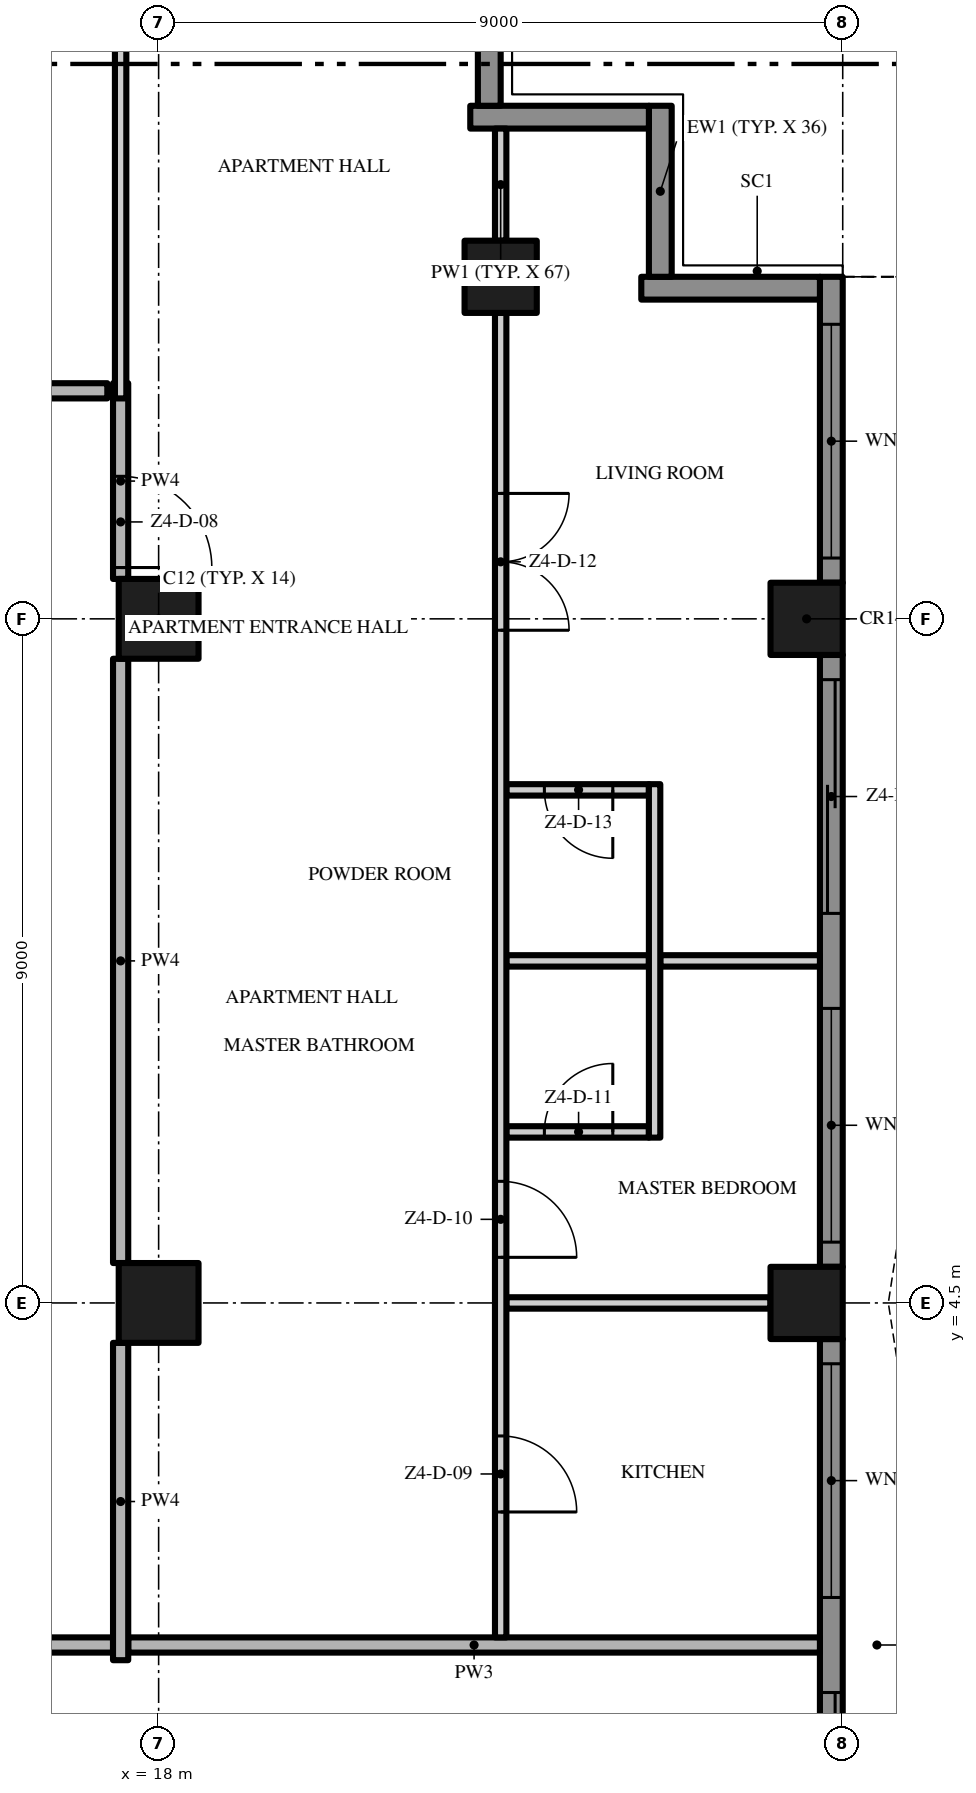
"""IFC4 building model, lengths in metres.
Left out: names, types, materials, properties, quantities, classifications, styles, units other than length and angle.
Written with IfcOpenShell. Run it as: python <this file> out.ifc"""

import sys

from ifc_helpers import new_model, si_unit, direction, frame, frame_2d, origin, origin_2d, place, context, subcontext, project, spatial, polyline, rectangle, outline, extrude, element, fill, save


model = new_model("IFC4")
c1 = context("Model", 3, precision=1e-05, world=origin(), true_north=direction((0.0, 1.0)))
c2 = subcontext(c1, "Body", "Model", "MODEL_VIEW")
j1 = project(units=[si_unit("LENGTHUNIT", "METRE"), si_unit("PLANEANGLEUNIT", "RADIAN")], contexts=[c1])
p1 = place(None, origin())
s1 = spatial("IfcSite", under=j1, at=p1, CompositionType="ELEMENT")
p2 = place(p1, origin())
s2 = spatial("IfcBuilding", under=s1, at=p2, CompositionType="ELEMENT")
p3 = place(p2, frame((0.0, 0.0, 218.6)))
s3 = spatial("IfcBuildingStorey", under=s2, at=p3, CompositionType="ELEMENT", Elevation=218.6)
for number, where, z_axis, x_axis in (
    (1, (18.0, 13.5, 0.0), (0.0, 0.0, 1.0), (1.0, 0.0, 0.0)),
    (2, (18.0, 4.5, 0.0), (0.0, 0.0, 1.0), (1.0, 0.0, 0.0)),
):
    element("IfcColumn", number, at=place(p3, frame(where, z_axis=z_axis, x_axis=x_axis)), inside=s3, PredefinedType="COLUMN", context=c2, shape_type="SweptSolid", body=[
        extrude(rectangle(XDim=1.05, YDim=1.05, at=origin_2d()), origin(), (0.0, 0.0, 1.0), 3.5),
    ])
for number, where, z_axis, x_axis in (
    (3, (26.525, 13.5, 0.0), (0.0, 0.0, 1.0), (1.0, 0.0, 0.0)),
    (4, (22.5, 18.0, 0.0), (0.0, 0.0, 1.0), (1.0, 0.0, 0.0)),
    (5, (26.525, 4.5, 0.0), (0.0, 0.0, 1.0), (1.0, 0.0, 0.0)),
):
    element("IfcColumn", number, at=place(p3, frame(where, z_axis=z_axis, x_axis=x_axis)), inside=s3, PredefinedType="COLUMN", context=c2, shape_type="SweptSolid", body=[
        extrude(rectangle(XDim=0.95, YDim=0.95, at=origin_2d()), origin(), (0.0, 0.0, 1.0), 3.5),
    ])
p4 = place(p3, frame((26.85, 4.025, 0.0), z_axis=(0.0, 0.0, 1.0), x_axis=(0.0, -1.0, 0.0)))
e6 = element("IfcWall", 6, at=p4, inside=s3, PredefinedType="SOLIDWALL", context=c2, shape_type="SweptSolid", body=[
    extrude(rectangle(XDim=8.05, YDim=0.3, at=frame_2d((4.025, 0.0))), origin(), (0.0, 0.0, 1.0), 3.5),
])
p5 = place(p4, frame((4.65, 0.0, 0.0)))
e7 = element("IfcOpeningElement", 7, at=p5, cuts=e6, PredefinedType="OPENING", context=c2, shape_type="SweptSolid", body=[
    extrude(rectangle(XDim=3.075, YDim=2.4, at=frame_2d((1.538, 1.2))), frame((0.0, 0.16, 0.0), z_axis=(0.0, -1.0, 0.0), x_axis=(1.0, 0.0, 0.0)), (0.0, 0.0, 1.0), 0.32),
])
p6 = place(p4, frame((0.325, 0.0, 0.45)))
e8 = element("IfcOpeningElement", 8, at=p6, cuts=e6, PredefinedType="OPENING", context=c2, shape_type="SweptSolid", body=[
    extrude(rectangle(XDim=3.075, YDim=2.65, at=frame_2d((1.538, 1.325))), frame((0.0, 0.16, 0.0), z_axis=(0.0, -1.0, 0.0), x_axis=(1.0, 0.0, 0.0)), (0.0, 0.0, 1.0), 0.32),
])
p7 = place(p3, frame((26.85, 13.025, 0.0), z_axis=(0.0, 0.0, 1.0), x_axis=(0.0, -1.0, 0.0)))
e9 = element("IfcWall", 9, at=p7, inside=s3, PredefinedType="SOLIDWALL", context=c2, shape_type="SweptSolid", body=[
    extrude(rectangle(XDim=8.05, YDim=0.3, at=frame_2d((4.025, 0.0))), origin(), (0.0, 0.0, 1.0), 3.5),
])
p8 = place(p7, frame((4.65, 0.0, 0.45)))
e10 = element("IfcOpeningElement", 10, at=p8, cuts=e9, PredefinedType="OPENING", context=c2, shape_type="SweptSolid", body=[
    extrude(rectangle(XDim=3.075, YDim=2.65, at=frame_2d((1.538, 1.325))), frame((0.0, 0.16, 0.0), z_axis=(0.0, -1.0, 0.0), x_axis=(1.0, 0.0, 0.0)), (0.0, 0.0, 1.0), 0.32),
])
p9 = place(p7, frame((0.325, 0.0, 0.0)))
e11 = element("IfcOpeningElement", 11, at=p9, cuts=e9, PredefinedType="OPENING", context=c2, shape_type="SweptSolid", body=[
    extrude(rectangle(XDim=3.075, YDim=2.4, at=frame_2d((1.538, 1.2))), frame((0.0, 0.16, 0.0), z_axis=(0.0, -1.0, 0.0), x_axis=(1.0, 0.0, 0.0)), (0.0, 0.0, 1.0), 0.32),
])
p10 = place(p3, frame((26.85, 18.0, 0.0), z_axis=(0.0, 0.0, 1.0), x_axis=(0.0, -1.0, 0.0)))
e12 = element("IfcWall", 12, at=p10, inside=s3, PredefinedType="SOLIDWALL", context=c2, shape_type="SweptSolid", body=[
    extrude(rectangle(XDim=4.025, YDim=0.3, at=frame_2d((2.013, 0.0))), origin(), (0.0, 0.0, 1.0), 3.5),
])
p11 = place(p10, frame((0.625, 0.0, 0.45)))
e13 = element("IfcOpeningElement", 13, at=p11, cuts=e12, PredefinedType="OPENING", context=c2, shape_type="SweptSolid", body=[
    extrude(rectangle(XDim=3.075, YDim=2.65, at=frame_2d((1.538, 1.325))), frame((0.0, 0.16, 0.0), z_axis=(0.0, -1.0, 0.0), x_axis=(1.0, 0.0, 0.0)), (0.0, 0.0, 1.0), 0.32),
])
p12 = place(p3, frame((24.35, 17.85, 0.0), z_axis=(0.0, 0.0, 1.0), x_axis=(1.0, 0.0, 0.0)))
e14 = element("IfcWall", 14, at=p12, inside=s3, PredefinedType="SOLIDWALL", context=c2, shape_type="SweptSolid", body=[
    extrude(rectangle(XDim=2.35, YDim=0.3, at=frame_2d((1.175, 0.0))), origin(), (0.0, 0.0, 1.0), 3.5),
])
p13 = place(p3, frame((24.6, 20.25, 0.0), z_axis=(0.0, 0.0, 1.0), x_axis=(0.0, -1.0, 0.0)))
e15 = element("IfcWall", 15, at=p13, inside=s3, PredefinedType="SOLIDWALL", context=c2, shape_type="SweptSolid", body=[
    extrude(rectangle(XDim=2.25, YDim=0.3, at=frame_2d((1.125, 0.0))), origin(), (0.0, 0.0, 1.0), 3.5),
])
p14 = place(p3, frame((22.1, 20.1, 0.0), z_axis=(0.0, 0.0, 1.0), x_axis=(1.0, 0.0, 0.0)))
e16 = element("IfcWall", 16, at=p14, inside=s3, PredefinedType="SOLIDWALL", context=c2, shape_type="SweptSolid", body=[
    extrude(rectangle(XDim=2.35, YDim=0.3, at=frame_2d((1.175, 0.0))), origin(), (0.0, 0.0, 1.0), 3.5),
])
p15 = place(p3, frame((22.35, 22.5, 0.0), z_axis=(0.0, 0.0, 1.0), x_axis=(0.0, -1.0, 0.0)))
e17 = element("IfcWall", 17, at=p15, inside=s3, PredefinedType="SOLIDWALL", context=c2, shape_type="SweptSolid", body=[
    extrude(rectangle(XDim=2.25, YDim=0.3, at=frame_2d((1.125, 0.0))), origin(), (0.0, 0.0, 1.0), 3.5),
])
p16 = place(p3, origin())
e18 = element("IfcWall", 18, at=p16, inside=s3, PredefinedType="USERDEFINED", context=c2, shape_type="SweptSolid", body=[
    extrude(outline(polyline([(30.0, -18.0), (29.771, -16.5), (29.171, -15.0), (28.429, -13.5), (27.829, -12.0), (27.6, -10.5), (27.829, -9.0), (28.429, -7.5), (29.171, -6.0), (29.771, -4.5), (30.0, -3.0), (29.771, -1.5), (29.171, 0.0), (28.429, 1.5), (27.829, 3.0), (27.6, 4.5), (27.829, 6.0), (28.429, 7.5), (29.171, 9.0), (29.771, 10.5), (30.0, 12.0), (29.771, 13.5), (29.171, 15.0), (28.429, 16.5), (27.829, 18.0), (27.597, 17.907), (28.201, 16.398), (28.942, 14.898), (29.528, 13.434), (29.747, 12.0), (29.528, 10.566), (28.942, 9.102), (28.201, 7.602), (27.586, 6.066), (27.347, 4.5), (27.586, 2.934), (28.201, 1.398), (28.942, -0.102), (29.528, -1.566), (29.747, -3.0), (29.528, -4.434), (28.942, -5.898), (28.201, -7.398), (27.586, -8.934), (27.347, -10.5), (27.586, -12.066), (28.201, -13.602), (28.942, -15.102), (29.528, -16.566), (29.753, -18.038), (30.0, -18.0)])), origin(), (0.0, 0.0, 1.0), 0.9),
])
p17 = place(p3, frame((17.4, 0.0, 0.0), z_axis=(0.0, 0.0, 1.0), x_axis=(-1.0, 0.0, 0.0)))
e19 = element("IfcWall", 19, at=p17, inside=s3, PredefinedType="PARTITIONING", context=c2, shape_type="SweptSolid", body=[
    extrude(rectangle(XDim=17.3, YDim=0.2, at=frame_2d((8.65, 0.0))), origin(), (0.0, 0.0, 1.0), 3.5),
])
p18 = place(p17, frame((7.65, 0.0, 0.0)))
e20 = element("IfcOpeningElement", 20, at=p18, cuts=e19, PredefinedType="OPENING", context=c2, shape_type="SweptSolid", body=[
    extrude(rectangle(XDim=1.5, YDim=2.4, at=frame_2d((0.75, 1.2))), frame((0.0, 0.11, 0.0), z_axis=(0.0, -1.0, 0.0), x_axis=(1.0, 0.0, 0.0)), (0.0, 0.0, 1.0), 0.22),
])
p19 = place(p3, frame((17.6, 0.0, 0.0), z_axis=(0.0, 0.0, 1.0), x_axis=(1.0, 0.0, 0.0)))
e21 = element("IfcWall", 21, at=p19, inside=s3, PredefinedType="PARTITIONING", context=c2, shape_type="SweptSolid", body=[
    extrude(rectangle(XDim=9.1, YDim=0.2, at=frame_2d((4.55, 0.0))), origin(), (0.0, 0.0, 1.0), 3.5),
])
p20 = place(p3, frame((22.575, 4.5, 0.0), z_axis=(0.0, 0.0, 1.0), x_axis=(1.0, 0.0, 0.0)))
e22 = element("IfcWall", 22, at=p20, inside=s3, PredefinedType="PARTITIONING", context=c2, shape_type="SweptSolid", body=[
    extrude(rectangle(XDim=3.475, YDim=0.15, at=frame_2d((1.738, 0.0))), origin(), (0.0, 0.0, 1.0), 3.5),
])
p21 = place(p3, frame((22.575, 6.75, 0.0), z_axis=(0.0, 0.0, 1.0), x_axis=(1.0, 0.0, 0.0)))
e23 = element("IfcWall", 23, at=p21, inside=s3, PredefinedType="PARTITIONING", context=c2, shape_type="SweptSolid", body=[
    extrude(rectangle(XDim=1.875, YDim=0.15, at=frame_2d((0.938, 0.0))), origin(), (0.0, 0.0, 1.0), 3.5),
])
p22 = place(p21, frame((0.5, 0.0, 0.0)))
e24 = element("IfcOpeningElement", 24, at=p22, cuts=e23, PredefinedType="OPENING", context=c2, shape_type="SweptSolid", body=[
    extrude(rectangle(XDim=0.9, YDim=2.1, at=frame_2d((0.45, 1.05))), frame((0.0, 0.085, 0.0), z_axis=(0.0, -1.0, 0.0), x_axis=(1.0, 0.0, 0.0)), (0.0, 0.0, 1.0), 0.17),
])
p23 = place(p3, frame((22.575, 9.0, 0.0), z_axis=(0.0, 0.0, 1.0), x_axis=(1.0, 0.0, 0.0)))
e25 = element("IfcWall", 25, at=p23, inside=s3, PredefinedType="PARTITIONING", context=c2, shape_type="SweptSolid", body=[
    extrude(rectangle(XDim=1.875, YDim=0.15, at=frame_2d((0.938, 0.0))), origin(), (0.0, 0.0, 1.0), 3.5),
])
p24 = place(p3, frame((24.6, 9.0, 0.0), z_axis=(0.0, 0.0, 1.0), x_axis=(1.0, 0.0, 0.0)))
e26 = element("IfcWall", 26, at=p24, inside=s3, PredefinedType="PARTITIONING", context=c2, shape_type="SweptSolid", body=[
    extrude(rectangle(XDim=2.1, YDim=0.15, at=frame_2d((1.05, 0.0))), origin(), (0.0, 0.0, 1.0), 3.5),
])
p25 = place(p3, frame((24.45, 11.25, 0.0), z_axis=(0.0, 0.0, 1.0), x_axis=(-1.0, 0.0, 0.0)))
e27 = element("IfcWall", 27, at=p25, inside=s3, PredefinedType="PARTITIONING", context=c2, shape_type="SweptSolid", body=[
    extrude(rectangle(XDim=1.875, YDim=0.15, at=frame_2d((0.938, 0.0))), origin(), (0.0, 0.0, 1.0), 3.5),
])
p26 = place(p25, frame((0.475, 0.0, 0.0)))
e28 = element("IfcOpeningElement", 28, at=p26, cuts=e27, PredefinedType="OPENING", context=c2, shape_type="SweptSolid", body=[
    extrude(rectangle(XDim=0.9, YDim=2.1, at=frame_2d((0.45, 1.05))), frame((0.0, 0.085, 0.0), z_axis=(0.0, -1.0, 0.0), x_axis=(1.0, 0.0, 0.0)), (0.0, 0.0, 1.0), 0.17),
])
p27 = place(p3, frame((13.5, 16.5, 0.0), z_axis=(0.0, 0.0, 1.0), x_axis=(1.0, 0.0, 0.0)))
e29 = element("IfcWall", 29, at=p27, inside=s3, PredefinedType="PARTITIONING", context=c2, shape_type="SweptSolid", body=[
    extrude(rectangle(XDim=3.825, YDim=0.2, at=frame_2d((1.913, 0.0))), origin(), (0.0, 0.0, 1.0), 3.5),
])
p28 = place(p27, frame((1.55, 0.0, 0.0)))
e30 = element("IfcOpeningElement", 30, at=p28, cuts=e29, PredefinedType="OPENING", context=c2, shape_type="SweptSolid", body=[
    extrude(rectangle(XDim=0.9, YDim=2.1, at=frame_2d((0.45, 1.05))), frame((0.0, 0.11, 0.0), z_axis=(0.0, -1.0, 0.0), x_axis=(1.0, 0.0, 0.0)), (0.0, 0.0, 1.0), 0.22),
])
p29 = place(p3, frame((17.5, -0.2, 0.0), z_axis=(0.0, 0.0, 1.0), x_axis=(0.0, 1.0, 0.0)))
e31 = element("IfcWall", 31, at=p29, inside=s3, PredefinedType="PARTITIONING", context=c2, shape_type="SweptSolid", body=[
    extrude(rectangle(XDim=4.175, YDim=0.2, at=frame_2d((2.087, 0.0))), origin(), (0.0, 0.0, 1.0), 3.5),
])
p30 = place(p3, frame((17.5, 5.025, 0.0), z_axis=(0.0, 0.0, 1.0), x_axis=(0.0, 1.0, 0.0)))
e32 = element("IfcWall", 32, at=p30, inside=s3, PredefinedType="PARTITIONING", context=c2, shape_type="SweptSolid", body=[
    extrude(rectangle(XDim=7.95, YDim=0.2, at=frame_2d((3.975, 0.0))), origin(), (0.0, 0.0, 1.0), 3.5),
])
p31 = place(p3, frame((17.5, 16.6, 0.0), z_axis=(0.0, 0.0, 1.0), x_axis=(0.0, -1.0, 0.0)))
e33 = element("IfcWall", 33, at=p31, inside=s3, PredefinedType="PARTITIONING", context=c2, shape_type="SweptSolid", body=[
    extrude(rectangle(XDim=2.575, YDim=0.2, at=frame_2d((1.288, 0.0))), origin(), (0.0, 0.0, 1.0), 3.5),
])
p32 = place(p31, frame((1.225, 0.0, 0.0)))
e34 = element("IfcOpeningElement", 34, at=p32, cuts=e33, PredefinedType="OPENING", context=c2, shape_type="SweptSolid", body=[
    extrude(rectangle(XDim=1.2, YDim=2.4, at=frame_2d((0.6, 1.2))), frame((0.0, 0.11, 0.0), z_axis=(0.0, -1.0, 0.0), x_axis=(1.0, 0.0, 0.0)), (0.0, 0.0, 1.0), 0.22),
])
p33 = place(p3, frame((17.5, 16.4, 0.0), z_axis=(0.0, 0.0, 1.0), x_axis=(0.0, 1.0, 0.0)))
e35 = element("IfcWall", 35, at=p33, inside=s3, PredefinedType="PARTITIONING", context=c2, shape_type="SweptSolid", body=[
    extrude(rectangle(XDim=5.15, YDim=0.15, at=frame_2d((2.575, 0.0))), origin(), (0.0, 0.0, 1.0), 3.5),
])
p34 = place(p3, frame((22.5, 17.525, 0.0), z_axis=(0.0, 0.0, 1.0), x_axis=(0.0, -1.0, 0.0)))
e36 = element("IfcWall", 36, at=p34, inside=s3, PredefinedType="PARTITIONING", context=c2, shape_type="SweptSolid", body=[
    extrude(rectangle(XDim=17.425, YDim=0.15, at=frame_2d((8.713, 0.0))), origin(), (0.0, 0.0, 1.0), 3.5),
])
p35 = place(p34, frame((14.775, 0.0, 0.0)))
e37 = element("IfcOpeningElement", 37, at=p35, cuts=e36, PredefinedType="OPENING", context=c2, shape_type="SweptSolid", body=[
    extrude(rectangle(XDim=1.0, YDim=2.4, at=frame_2d((0.5, 1.2))), frame((0.0, 0.085, 0.0), z_axis=(0.0, -1.0, 0.0), x_axis=(1.0, 0.0, 0.0)), (0.0, 0.0, 1.0), 0.17),
])
p36 = place(p34, frame((11.425, 0.0, 0.0)))
e38 = element("IfcOpeningElement", 38, at=p36, cuts=e36, PredefinedType="OPENING", context=c2, shape_type="SweptSolid", body=[
    extrude(rectangle(XDim=1.0, YDim=2.4, at=frame_2d((0.5, 1.2))), frame((0.0, 0.085, 0.0), z_axis=(0.0, -1.0, 0.0), x_axis=(1.0, 0.0, 0.0)), (0.0, 0.0, 1.0), 0.17),
])
p37 = place(p34, frame((2.375, 0.0, 0.0)))
e39 = element("IfcOpeningElement", 39, at=p37, cuts=e36, PredefinedType="OPENING", context=c2, shape_type="SweptSolid", body=[
    extrude(rectangle(XDim=1.8, YDim=2.4, at=frame_2d((0.9, 1.2))), frame((0.0, 0.085, 0.0), z_axis=(0.0, -1.0, 0.0), x_axis=(1.0, 0.0, 0.0)), (0.0, 0.0, 1.0), 0.17),
])
p38 = place(p3, frame((22.5, 18.475, 0.0), z_axis=(0.0, 0.0, 1.0), x_axis=(0.0, 1.0, 0.0)))
e40 = element("IfcWall", 40, at=p38, inside=s3, PredefinedType="PARTITIONING", context=c2, shape_type="SweptSolid", body=[
    extrude(rectangle(XDim=1.475, YDim=0.15, at=frame_2d((0.738, 0.0))), origin(), (0.0, 0.0, 1.0), 3.5),
])
p39 = place(p3, frame((24.525, 6.675, 0.0), z_axis=(0.0, 0.0, 1.0), x_axis=(0.0, 1.0, 0.0)))
e41 = element("IfcWall", 41, at=p39, inside=s3, PredefinedType="PARTITIONING", context=c2, shape_type="SweptSolid", body=[
    extrude(rectangle(XDim=4.65, YDim=0.15, at=frame_2d((2.325, 0.0))), origin(), (0.0, 0.0, 1.0), 3.5),
])
p40 = place(p5, origin())
e42 = element("IfcDoor", 42, at=p40, inside=s3, OperationType="SINGLE_SWING_LEFT", PredefinedType="DOOR", context=c2, shape_type="SweptSolid", body=[
    extrude(rectangle(XDim=3.075, YDim=2.4, at=frame_2d((1.538, 1.2))), frame((0.0, 0.025, 0.0), z_axis=(0.0, -1.0, 0.0), x_axis=(1.0, 0.0, 0.0)), (0.0, 0.0, 1.0), 0.05),
])
fill(e7, e42)
p41 = place(p6, origin())
e43 = element("IfcWindow", 43, at=p41, inside=s3, PartitioningType="SINGLE_PANEL", PredefinedType="WINDOW", context=c2, shape_type="SweptSolid", body=[
    extrude(rectangle(XDim=3.075, YDim=2.65, at=frame_2d((1.538, 1.325))), frame((0.0, 0.03, 0.0), z_axis=(0.0, -1.0, 0.0), x_axis=(1.0, 0.0, 0.0)), (0.0, 0.0, 1.0), 0.06),
])
fill(e8, e43)
p42 = place(p8, origin())
e44 = element("IfcWindow", 44, at=p42, inside=s3, PartitioningType="SINGLE_PANEL", PredefinedType="WINDOW", context=c2, shape_type="SweptSolid", body=[
    extrude(rectangle(XDim=3.075, YDim=2.65, at=frame_2d((1.538, 1.325))), frame((0.0, 0.03, 0.0), z_axis=(0.0, -1.0, 0.0), x_axis=(1.0, 0.0, 0.0)), (0.0, 0.0, 1.0), 0.06),
])
fill(e10, e44)
p43 = place(p9, origin())
e45 = element("IfcDoor", 45, at=p43, inside=s3, OperationType="SINGLE_SWING_LEFT", PredefinedType="DOOR", context=c2, shape_type="SweptSolid", body=[
    extrude(rectangle(XDim=3.075, YDim=2.4, at=frame_2d((1.538, 1.2))), frame((0.0, 0.025, 0.0), z_axis=(0.0, -1.0, 0.0), x_axis=(1.0, 0.0, 0.0)), (0.0, 0.0, 1.0), 0.05),
])
fill(e11, e45)
p44 = place(p11, origin())
e46 = element("IfcWindow", 46, at=p44, inside=s3, PartitioningType="SINGLE_PANEL", PredefinedType="WINDOW", context=c2, shape_type="SweptSolid", body=[
    extrude(rectangle(XDim=3.075, YDim=2.65, at=frame_2d((1.538, 1.325))), frame((0.0, 0.03, 0.0), z_axis=(0.0, -1.0, 0.0), x_axis=(1.0, 0.0, 0.0)), (0.0, 0.0, 1.0), 0.06),
])
fill(e13, e46)
p45 = place(p32, origin())
e47 = element("IfcDoor", 47, at=p45, inside=s3, OperationType="SINGLE_SWING_RIGHT", PredefinedType="DOOR", context=c2, shape_type="SweptSolid", body=[
    extrude(rectangle(XDim=1.2, YDim=2.4, at=frame_2d((0.6, 1.2))), frame((0.0, 0.025, 0.0), z_axis=(0.0, -1.0, 0.0), x_axis=(1.0, 0.0, 0.0)), (0.0, 0.0, 1.0), 0.05),
])
fill(e34, e47)
p46 = place(p35, origin())
e48 = element("IfcDoor", 48, at=p46, inside=s3, OperationType="SINGLE_SWING_RIGHT", PredefinedType="DOOR", context=c2, shape_type="SweptSolid", body=[
    extrude(rectangle(XDim=1.0, YDim=2.4, at=frame_2d((0.5, 1.2))), frame((0.0, 0.025, 0.0), z_axis=(0.0, -1.0, 0.0), x_axis=(1.0, 0.0, 0.0)), (0.0, 0.0, 1.0), 0.05),
])
fill(e37, e48)
p47 = place(p36, origin())
e49 = element("IfcDoor", 49, at=p47, inside=s3, OperationType="SINGLE_SWING_RIGHT", PredefinedType="DOOR", context=c2, shape_type="SweptSolid", body=[
    extrude(rectangle(XDim=1.0, YDim=2.4, at=frame_2d((0.5, 1.2))), frame((0.0, 0.025, 0.0), z_axis=(0.0, -1.0, 0.0), x_axis=(1.0, 0.0, 0.0)), (0.0, 0.0, 1.0), 0.05),
])
fill(e38, e49)
p48 = place(p22, origin())
e50 = element("IfcDoor", 50, at=p48, inside=s3, OperationType="SINGLE_SWING_RIGHT", PredefinedType="DOOR", context=c2, shape_type="SweptSolid", body=[
    extrude(rectangle(XDim=0.9, YDim=2.1, at=frame_2d((0.45, 1.05))), frame((0.0, 0.025, 0.0), z_axis=(0.0, -1.0, 0.0), x_axis=(1.0, 0.0, 0.0)), (0.0, 0.0, 1.0), 0.05),
])
fill(e24, e50)
p49 = place(p37, origin())
e51 = element("IfcDoor", 51, at=p49, inside=s3, OperationType="DOUBLE_DOOR_SINGLE_SWING", PredefinedType="DOOR", context=c2, shape_type="SweptSolid", body=[
    extrude(rectangle(XDim=1.8, YDim=2.4, at=frame_2d((0.9, 1.2))), frame((0.0, 0.025, 0.0), z_axis=(0.0, -1.0, 0.0), x_axis=(1.0, 0.0, 0.0)), (0.0, 0.0, 1.0), 0.05),
])
fill(e39, e51)
p50 = place(p26, origin())
e52 = element("IfcDoor", 52, at=p50, inside=s3, OperationType="SINGLE_SWING_LEFT", PredefinedType="DOOR", context=c2, shape_type="SweptSolid", body=[
    extrude(rectangle(XDim=0.9, YDim=2.1, at=frame_2d((0.45, 1.05))), frame((0.0, 0.025, 0.0), z_axis=(0.0, -1.0, 0.0), x_axis=(1.0, 0.0, 0.0)), (0.0, 0.0, 1.0), 0.05),
])
fill(e28, e52)
save(model, sys.argv[1])
